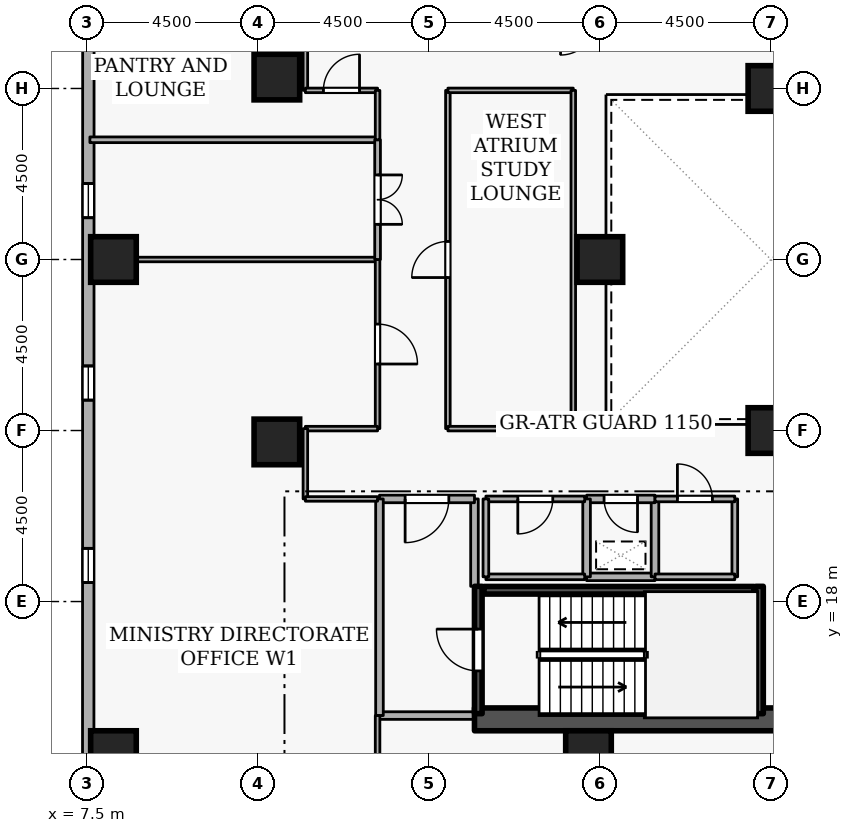
"""IFC4 building model, lengths in metres.
Left out: names, types, materials, properties, quantities, classifications, styles, units other than length and angle.
Written with IfcOpenShell. Run it as: python <this file> out.ifc"""

import sys

from ifc_helpers import new_model, si_unit, direction, frame, frame_2d, origin, origin_2d, place, context, subcontext, project, spatial, rectangle, extrude, element, fill, save


model = new_model("IFC4")
c1 = context("Model", 3, precision=1e-05, world=origin(), true_north=direction((0.0, 1.0)))
c2 = subcontext(c1, "Body", "Model", "MODEL_VIEW")
j1 = project(units=[si_unit("LENGTHUNIT", "METRE"), si_unit("PLANEANGLEUNIT", "RADIAN")], contexts=[c1])
p1 = place(None, origin())
s1 = spatial("IfcSite", under=j1, at=p1, CompositionType="ELEMENT")
p2 = place(p1, origin())
s2 = spatial("IfcBuilding", under=s1, at=p2, CompositionType="ELEMENT")
p3 = place(p2, frame((0.0, 0.0, 90.9)))
s3 = spatial("IfcBuildingStorey", under=s2, at=p3, CompositionType="ELEMENT", Elevation=90.9)
p4 = place(p3, frame((17.7, 14.9, 0.0), z_axis=(0.0, 0.0, 1.0), x_axis=(1.0, 0.0, 0.0)))
e1 = element("IfcWall", 1, at=p4, inside=s3, PredefinedType="SHEAR", context=c2, shape_type="SweptSolid", body=[
    extrude(rectangle(XDim=15.6, YDim=0.6, at=frame_2d((7.8, 0.0))), origin(), (0.0, 0.0, 1.0), 3.6),
])
for number, where, z_axis, x_axis in (
    (2, (8.2, 14.0, 0.0), (0.0, 0.0, 1.0), (1.0, 0.0, 0.0)),
    (3, (8.2, 27.0, 0.0), (0.0, 0.0, 1.0), (1.0, 0.0, 0.0)),
    (4, (12.5, 22.2, 0.0), (0.0, 0.0, 1.0), (1.0, 0.0, 0.0)),
    (5, (12.5, 31.8, 0.0), (0.0, 0.0, 1.0), (1.0, 0.0, 0.0)),
    (6, (20.7, 14.0, 0.0), (0.0, 0.0, 1.0), (1.0, 0.0, 0.0)),
    (7, (25.5, 22.5, 0.0), (0.0, 0.0, 1.0), (1.0, 0.0, 0.0)),
    (8, (25.5, 31.5, 0.0), (0.0, 0.0, 1.0), (1.0, 0.0, 0.0)),
    (9, (21.0, 27.0, 0.0), (0.0, 0.0, 1.0), (1.0, 0.0, 0.0)),
):
    element("IfcColumn", number, at=place(p3, frame(where, z_axis=z_axis, x_axis=x_axis)), inside=s3, PredefinedType="COLUMN", context=c2, shape_type="SweptSolid", body=[
        extrude(rectangle(XDim=1.2, YDim=1.2, at=origin_2d()), origin(), (0.0, 0.0, 1.0), 3.6),
    ])
p5 = place(p3, frame((7.543, 46.099, 0.0), z_axis=(0.0, 0.0, 1.0), x_axis=(-0.000212414941, -0.99999997744, 0.0)))
e10 = element("IfcWall", 10, at=p5, inside=s3, PredefinedType="STANDARD", context=c2, shape_type="SweptSolid", body=[
    extrude(rectangle(XDim=34.481, YDim=0.3, at=frame_2d((17.24, 0.0))), origin(), (0.0, 0.0, 1.0), 2.7),
])
p6 = place(p5, frame((7.5, 0.0, 0.72)))
e11 = element("IfcOpeningElement", 11, at=p6, cuts=e10, PredefinedType="OPENING", context=c2, shape_type="SweptSolid", body=[
    extrude(rectangle(XDim=0.9, YDim=1.75, at=frame_2d((0.45, 0.875))), frame((0.0, 0.16, 0.0), z_axis=(0.0, -1.0, 0.0), x_axis=(1.0, 0.0, 0.0)), (0.0, 0.0, 1.0), 0.32),
])
p7 = place(p5, frame((12.3, 0.0, 0.72)))
e12 = element("IfcOpeningElement", 12, at=p7, cuts=e10, PredefinedType="OPENING", context=c2, shape_type="SweptSolid", body=[
    extrude(rectangle(XDim=0.9, YDim=1.75, at=frame_2d((0.45, 0.875))), frame((0.0, 0.16, 0.0), z_axis=(0.0, -1.0, 0.0), x_axis=(1.0, 0.0, 0.0)), (0.0, 0.0, 1.0), 0.32),
])
p8 = place(p5, frame((17.1, 0.0, 0.72)))
e13 = element("IfcOpeningElement", 13, at=p8, cuts=e10, PredefinedType="OPENING", context=c2, shape_type="SweptSolid", body=[
    extrude(rectangle(XDim=0.9, YDim=1.75, at=frame_2d((0.45, 0.875))), frame((0.0, 0.16, 0.0), z_axis=(0.0, -1.0, 0.0), x_axis=(1.0, 0.0, 0.0)), (0.0, 0.0, 1.0), 0.32),
])
p9 = place(p5, frame((21.9, 0.0, 0.72)))
e14 = element("IfcOpeningElement", 14, at=p9, cuts=e10, PredefinedType="OPENING", context=c2, shape_type="SweptSolid", body=[
    extrude(rectangle(XDim=0.9, YDim=1.75, at=frame_2d((0.45, 0.875))), frame((0.0, 0.16, 0.0), z_axis=(0.0, -1.0, 0.0), x_axis=(1.0, 0.0, 0.0)), (0.0, 0.0, 1.0), 0.32),
])
p10 = place(p5, frame((26.7, 0.0, 0.72)))
e15 = element("IfcOpeningElement", 15, at=p10, cuts=e10, PredefinedType="OPENING", context=c2, shape_type="SweptSolid", body=[
    extrude(rectangle(XDim=0.9, YDim=1.75, at=frame_2d((0.45, 0.875))), frame((0.0, 0.16, 0.0), z_axis=(0.0, -1.0, 0.0), x_axis=(1.0, 0.0, 0.0)), (0.0, 0.0, 1.0), 0.32),
])
p11 = place(p3, frame((17.8, 15.05, 0.0), z_axis=(0.0, 0.0, 1.0), x_axis=(0.0, 1.0, 0.0)))
e16 = element("IfcWall", 16, at=p11, inside=s3, PredefinedType="SHEAR", context=c2, shape_type="SweptSolid", body=[
    extrude(rectangle(XDim=3.35, YDim=0.2, at=frame_2d((1.675, 0.0))), origin(), (0.0, 0.0, 1.0), 3.6),
])
p12 = place(p11, frame((1.125, 0.0, 0.0)))
e17 = element("IfcOpeningElement", 17, at=p12, cuts=e16, PredefinedType="OPENING", context=c2, shape_type="SweptSolid", body=[
    extrude(rectangle(XDim=1.1, YDim=2.1, at=frame_2d((0.55, 1.05))), frame((0.0, 0.11, 0.0), z_axis=(0.0, -1.0, 0.0), x_axis=(1.0, 0.0, 0.0)), (0.0, 0.0, 1.0), 0.22),
])
p13 = place(p3, frame((25.2, 18.4, 0.0), z_axis=(0.0, 0.0, 1.0), x_axis=(0.0, -1.0, 0.0)))
e18 = element("IfcWall", 18, at=p13, inside=s3, PredefinedType="SHEAR", context=c2, shape_type="SweptSolid", body=[
    extrude(rectangle(XDim=3.35, YDim=0.2, at=frame_2d((1.675, 0.0))), origin(), (0.0, 0.0, 1.0), 3.6),
])
p14 = place(p3, frame((25.05, 18.297, 0.0), z_axis=(0.0, 0.0, 1.0), x_axis=(-1.0, 0.0, 0.0)))
e19 = element("IfcWall", 19, at=p14, inside=s3, PredefinedType="SHEAR", context=c2, shape_type="SweptSolid", body=[
    extrude(rectangle(XDim=7.1, YDim=0.2, at=frame_2d((3.55, 0.0))), origin(), (0.0, 0.0, 1.0), 3.6),
])
p15 = place(p3, frame((15.2, 15.0, 0.0), z_axis=(0.0, 0.0, 1.0), x_axis=(1.0, 0.0, 0.0)))
e20 = element("IfcWall", 20, at=p15, inside=s3, PredefinedType="STANDARD", context=c2, shape_type="SweptSolid", body=[
    extrude(rectangle(XDim=2.5, YDim=0.2, at=frame_2d((1.25, 0.0))), origin(), (0.0, 0.0, 1.0), 3.34),
])
p16 = place(p3, frame((17.7, 18.4, 0.0), z_axis=(0.0, 0.0, 1.0), x_axis=(0.0, 1.0, 0.0)))
e21 = element("IfcWall", 21, at=p16, inside=s3, PredefinedType="STANDARD", context=c2, shape_type="SweptSolid", body=[
    extrude(rectangle(XDim=2.3, YDim=0.2, at=frame_2d((1.15, 0.0))), origin(), (0.0, 0.0, 1.0), 2.545),
])
p17 = place(p3, frame((17.7, 20.7, 0.0), z_axis=(0.0, 0.0, 1.0), x_axis=(-1.0, 0.0, 0.0)))
e22 = element("IfcWall", 22, at=p17, inside=s3, PredefinedType="STANDARD", context=c2, shape_type="SweptSolid", body=[
    extrude(rectangle(XDim=2.5, YDim=0.2, at=frame_2d((1.25, 0.0))), origin(), (0.0, 0.0, 1.0), 3.34),
])
p18 = place(p17, frame((0.675, 0.0, 0.0)))
e23 = element("IfcOpeningElement", 23, at=p18, cuts=e22, PredefinedType="OPENING", context=c2, shape_type="SweptSolid", body=[
    extrude(rectangle(XDim=1.15, YDim=2.1, at=frame_2d((0.575, 1.05))), frame((0.0, 0.11, 0.0), z_axis=(0.0, -1.0, 0.0), x_axis=(1.0, 0.0, 0.0)), (0.0, 0.0, 1.0), 0.22),
])
p19 = place(p3, frame((15.2, 20.7, 0.0), z_axis=(0.0, 0.0, 1.0), x_axis=(0.0, -1.0, 0.0)))
e24 = element("IfcWall", 24, at=p19, inside=s3, PredefinedType="STANDARD", context=c2, shape_type="SweptSolid", body=[
    extrude(rectangle(XDim=5.7, YDim=0.2, at=frame_2d((2.85, 0.0))), origin(), (0.0, 0.0, 1.0), 3.34),
])
p20 = place(p3, frame((20.65, 18.65, 0.0), z_axis=(0.0, 0.0, 1.0), x_axis=(1.0, 0.0, 0.0)))
e25 = element("IfcWall", 25, at=p20, inside=s3, PredefinedType="STANDARD", context=c2, shape_type="SweptSolid", body=[
    extrude(rectangle(XDim=1.8, YDim=0.2, at=frame_2d((0.9, 0.0))), origin(), (0.0, 0.0, 1.0), 3.34),
])
p21 = place(p3, frame((22.45, 18.65, 0.0), z_axis=(0.0, 0.0, 1.0), x_axis=(0.0, 1.0, 0.0)))
e26 = element("IfcWall", 26, at=p21, inside=s3, PredefinedType="STANDARD", context=c2, shape_type="SweptSolid", body=[
    extrude(rectangle(XDim=2.05, YDim=0.2, at=frame_2d((1.025, 0.0))), origin(), (0.0, 0.0, 1.0), 3.34),
])
p22 = place(p3, frame((22.45, 20.7, 0.0), z_axis=(0.0, 0.0, 1.0), x_axis=(-1.0, 0.0, 0.0)))
e27 = element("IfcWall", 27, at=p22, inside=s3, PredefinedType="STANDARD", context=c2, shape_type="SweptSolid", body=[
    extrude(rectangle(XDim=1.8, YDim=0.2, at=frame_2d((0.9, 0.0))), origin(), (0.0, 0.0, 1.0), 3.34),
])
p23 = place(p22, frame((0.46, 0.0, 0.0)))
e28 = element("IfcOpeningElement", 28, at=p23, cuts=e27, PredefinedType="OPENING", context=c2, shape_type="SweptSolid", body=[
    extrude(rectangle(XDim=0.88, YDim=2.04, at=frame_2d((0.44, 1.02))), frame((0.0, 0.11, 0.0), z_axis=(0.0, -1.0, 0.0), x_axis=(1.0, 0.0, 0.0)), (0.0, 0.0, 1.0), 0.22),
])
p24 = place(p3, frame((20.65, 20.7, 0.0), z_axis=(0.0, 0.0, 1.0), x_axis=(0.0, -1.0, 0.0)))
e29 = element("IfcWall", 29, at=p24, inside=s3, PredefinedType="STANDARD", context=c2, shape_type="SweptSolid", body=[
    extrude(rectangle(XDim=2.05, YDim=0.2, at=frame_2d((1.025, 0.0))), origin(), (0.0, 0.0, 1.0), 3.34),
])
p25 = place(p3, frame((18.0, 18.65, 0.0), z_axis=(0.0, 0.0, 1.0), x_axis=(1.0, 0.0, 0.0)))
e30 = element("IfcWall", 30, at=p25, inside=s3, PredefinedType="PARTITIONING", context=c2, shape_type="SweptSolid", body=[
    extrude(rectangle(XDim=2.6, YDim=0.15, at=frame_2d((1.3, 0.0))), origin(), (0.0, 0.0, 1.0), 3.34),
])
p26 = place(p3, frame((20.6, 20.7, 0.0), z_axis=(0.0, 0.0, 1.0), x_axis=(-1.0, 0.0, 0.0)))
e31 = element("IfcWall", 31, at=p26, inside=s3, PredefinedType="PARTITIONING", context=c2, shape_type="SweptSolid", body=[
    extrude(rectangle(XDim=2.6, YDim=0.15, at=frame_2d((1.3, 0.0))), origin(), (0.0, 0.0, 1.0), 3.34),
])
p27 = place(p26, frame((0.84, 0.0, 0.0)))
e32 = element("IfcOpeningElement", 32, at=p27, cuts=e31, PredefinedType="OPENING", context=c2, shape_type="SweptSolid", body=[
    extrude(rectangle(XDim=0.92, YDim=2.08, at=frame_2d((0.46, 1.04))), frame((0.0, 0.085, 0.0), z_axis=(0.0, -1.0, 0.0), x_axis=(1.0, 0.0, 0.0)), (0.0, 0.0, 1.0), 0.17),
])
p28 = place(p3, frame((18.0, 20.7, 0.0), z_axis=(0.0, 0.0, 1.0), x_axis=(0.0, -1.0, 0.0)))
e33 = element("IfcWall", 33, at=p28, inside=s3, PredefinedType="PARTITIONING", context=c2, shape_type="SweptSolid", body=[
    extrude(rectangle(XDim=2.05, YDim=0.15, at=frame_2d((1.025, 0.0))), origin(), (0.0, 0.0, 1.0), 2.545),
])
p29 = place(p3, frame((24.55, 20.7, 0.0), z_axis=(0.0, 0.0, 1.0), x_axis=(0.0, -1.0, 0.0)))
e34 = element("IfcWall", 34, at=p29, inside=s3, PredefinedType="PARTITIONING", context=c2, shape_type="SweptSolid", body=[
    extrude(rectangle(XDim=2.05, YDim=0.15, at=frame_2d((1.025, 0.0))), origin(), (0.0, 0.0, 1.0), 3.34),
])
p30 = place(p3, frame((24.55, 18.65, 0.0), z_axis=(0.0, 0.0, 1.0), x_axis=(-1.0, 0.0, 0.0)))
e35 = element("IfcWall", 35, at=p30, inside=s3, PredefinedType="PARTITIONING", context=c2, shape_type="SweptSolid", body=[
    extrude(rectangle(XDim=2.1, YDim=0.15, at=frame_2d((1.05, 0.0))), origin(), (0.0, 0.0, 1.0), 3.34),
])
p31 = place(p3, frame((22.45, 20.7, 0.0), z_axis=(0.0, 0.0, 1.0), x_axis=(1.0, 0.0, 0.0)))
e36 = element("IfcWall", 36, at=p31, inside=s3, PredefinedType="PARTITIONING", context=c2, shape_type="SweptSolid", body=[
    extrude(rectangle(XDim=2.1, YDim=0.15, at=frame_2d((1.05, 0.0))), origin(), (0.0, 0.0, 1.0), 3.34),
])
p32 = place(p31, frame((0.59, 0.0, 0.0)))
e37 = element("IfcOpeningElement", 37, at=p32, cuts=e36, PredefinedType="OPENING", context=c2, shape_type="SweptSolid", body=[
    extrude(rectangle(XDim=0.92, YDim=2.08, at=frame_2d((0.46, 1.04))), frame((0.0, 0.085, 0.0), z_axis=(0.0, -1.0, 0.0), x_axis=(1.0, 0.0, 0.0)), (0.0, 0.0, 1.0), 0.17),
])
p33 = place(p3, frame((8.2, 27.0, 0.0), z_axis=(0.0, 0.0, 1.0), x_axis=(1.0, 0.0, 0.0)))
e38 = element("IfcWall", 38, at=p33, inside=s3, PredefinedType="PARTITIONING", context=c2, shape_type="SweptSolid", body=[
    extrude(rectangle(XDim=6.95, YDim=0.12, at=frame_2d((3.475, 0.0))), origin(), (0.0, 0.0, 1.0), 2.932),
])
p34 = place(p3, frame((15.15, 27.0, 0.0), z_axis=(0.0, 0.0, 1.0), x_axis=(0.0, -1.0, 0.0)))
e39 = element("IfcWall", 39, at=p34, inside=s3, PredefinedType="PARTITIONING", context=c2, shape_type="SweptSolid", body=[
    extrude(rectangle(XDim=4.45, YDim=0.12, at=frame_2d((2.225, 0.0))), origin(), (0.0, 0.0, 1.0), 3.34),
])
p35 = place(p34, frame((1.7, 0.0, 0.0)))
e40 = element("IfcOpeningElement", 40, at=p35, cuts=e39, PredefinedType="OPENING", context=c2, shape_type="SweptSolid", body=[
    extrude(rectangle(XDim=1.05, YDim=2.1, at=frame_2d((0.525, 1.05))), frame((0.0, 0.07, 0.0), z_axis=(0.0, -1.0, 0.0), x_axis=(1.0, 0.0, 0.0)), (0.0, 0.0, 1.0), 0.14),
])
p36 = place(p3, frame((15.15, 22.55, 0.0), z_axis=(0.0, 0.0, 1.0), x_axis=(-1.0, 0.0, 0.0)))
e41 = element("IfcWall", 41, at=p36, inside=s3, PredefinedType="PARTITIONING", context=c2, shape_type="SweptSolid", body=[
    extrude(rectangle(XDim=1.9, YDim=0.12, at=frame_2d((0.95, 0.0))), origin(), (0.0, 0.0, 1.0), 3.34),
])
p37 = place(p3, frame((13.25, 22.55, 0.0), z_axis=(0.0, 0.0, 1.0), x_axis=(0.0, -1.0, 0.0)))
e42 = element("IfcWall", 42, at=p37, inside=s3, PredefinedType="PARTITIONING", context=c2, shape_type="SweptSolid", body=[
    extrude(rectangle(XDim=1.85, YDim=0.12, at=frame_2d((0.925, 0.0))), origin(), (0.0, 0.0, 1.0), 3.34),
])
p38 = place(p3, frame((13.25, 20.7, 0.0), z_axis=(0.0, 0.0, 1.0), x_axis=(1.0, 0.0, 0.0)))
e43 = element("IfcWall", 43, at=p38, inside=s3, PredefinedType="PARTITIONING", context=c2, shape_type="SweptSolid", body=[
    extrude(rectangle(XDim=1.9, YDim=0.12, at=frame_2d((0.95, 0.0))), origin(), (0.0, 0.0, 1.0), 3.34),
])
p39 = place(p3, frame((15.15, 15.0, 0.0), z_axis=(0.0, 0.0, 1.0), x_axis=(0.0, -1.0, 0.0)))
e44 = element("IfcWall", 44, at=p39, inside=s3, PredefinedType="PARTITIONING", context=c2, shape_type="SweptSolid", body=[
    extrude(rectangle(XDim=5.92, YDim=0.12, at=frame_2d((2.96, 0.0))), origin(), (0.0, 0.0, 1.0), 3.34),
])
p40 = place(p3, frame((7.58, 30.15, 0.0), z_axis=(0.0, 0.0, 1.0), x_axis=(1.0, 0.0, 0.0)))
e45 = element("IfcWall", 45, at=p40, inside=s3, PredefinedType="PARTITIONING", context=c2, shape_type="SweptSolid", body=[
    extrude(rectangle(XDim=7.57, YDim=0.15, at=frame_2d((3.785, 0.0))), origin(), (0.0, 0.0, 1.0), 3.34),
])
p41 = place(p3, frame((15.15, 30.15, 0.0), z_axis=(0.0, 0.0, 1.0), x_axis=(0.0, -1.0, 0.0)))
e46 = element("IfcWall", 46, at=p41, inside=s3, PredefinedType="PARTITIONING", context=c2, shape_type="SweptSolid", body=[
    extrude(rectangle(XDim=3.15, YDim=0.15, at=frame_2d((1.575, 0.0))), origin(), (0.0, 0.0, 1.0), 3.34),
])
p42 = place(p41, frame((0.925, 0.0, 0.0)))
e47 = element("IfcOpeningElement", 47, at=p42, cuts=e46, PredefinedType="OPENING", context=c2, shape_type="SweptSolid", body=[
    extrude(rectangle(XDim=1.3, YDim=2.12, at=frame_2d((0.65, 1.06))), frame((0.0, 0.085, 0.0), z_axis=(0.0, -1.0, 0.0), x_axis=(1.0, 0.0, 0.0)), (0.0, 0.0, 1.0), 0.17),
])
p43 = place(p3, frame((13.25, 33.3, 0.0), z_axis=(0.0, 0.0, 1.0), x_axis=(0.0, -1.0, 0.0)))
e48 = element("IfcWall", 48, at=p43, inside=s3, PredefinedType="PARTITIONING", context=c2, shape_type="SweptSolid", body=[
    extrude(rectangle(XDim=1.85, YDim=0.12, at=frame_2d((0.925, 0.0))), origin(), (0.0, 0.0, 1.0), 3.34),
])
p44 = place(p3, frame((13.25, 31.45, 0.0), z_axis=(0.0, 0.0, 1.0), x_axis=(1.0, 0.0, 0.0)))
e49 = element("IfcWall", 49, at=p44, inside=s3, PredefinedType="PARTITIONING", context=c2, shape_type="SweptSolid", body=[
    extrude(rectangle(XDim=1.9, YDim=0.12, at=frame_2d((0.95, 0.0))), origin(), (0.0, 0.0, 1.0), 3.34),
])
p45 = place(p44, frame((0.475, 0.0, 0.0)))
e50 = element("IfcOpeningElement", 50, at=p45, cuts=e49, PredefinedType="OPENING", context=c2, shape_type="SweptSolid", body=[
    extrude(rectangle(XDim=0.95, YDim=2.1, at=frame_2d((0.475, 1.05))), frame((0.0, 0.07, 0.0), z_axis=(0.0, -1.0, 0.0), x_axis=(1.0, 0.0, 0.0)), (0.0, 0.0, 1.0), 0.14),
])
p46 = place(p3, frame((15.15, 31.45, 0.0), z_axis=(0.0, 0.0, 1.0), x_axis=(0.0, -1.0, 0.0)))
e51 = element("IfcWall", 51, at=p46, inside=s3, PredefinedType="PARTITIONING", context=c2, shape_type="SweptSolid", body=[
    extrude(rectangle(XDim=1.3, YDim=0.12, at=frame_2d((0.65, 0.0))), origin(), (0.0, 0.0, 1.0), 3.34),
])
p47 = place(p3, frame((17.0, 22.55, 0.0), z_axis=(0.0, 0.0, 1.0), x_axis=(0.0, 1.0, 0.0)))
e52 = element("IfcWall", 52, at=p47, inside=s3, PredefinedType="PARTITIONING", context=c2, shape_type="SweptSolid", body=[
    extrude(rectangle(XDim=8.9, YDim=0.12, at=frame_2d((4.45, 0.0))), origin(), (0.0, 0.0, 1.0), 3.34),
])
p48 = place(p47, frame((3.975, 0.0, 0.0)))
e53 = element("IfcOpeningElement", 53, at=p48, cuts=e52, PredefinedType="OPENING", context=c2, shape_type="SweptSolid", body=[
    extrude(rectangle(XDim=0.95, YDim=2.1, at=frame_2d((0.475, 1.05))), frame((0.0, 0.07, 0.0), z_axis=(0.0, -1.0, 0.0), x_axis=(1.0, 0.0, 0.0)), (0.0, 0.0, 1.0), 0.14),
])
p49 = place(p3, frame((17.0, 31.45, 0.0), z_axis=(0.0, 0.0, 1.0), x_axis=(1.0, 0.0, 0.0)))
e54 = element("IfcWall", 54, at=p49, inside=s3, PredefinedType="PARTITIONING", context=c2, shape_type="SweptSolid", body=[
    extrude(rectangle(XDim=3.3, YDim=0.12, at=frame_2d((1.65, 0.0))), origin(), (0.0, 0.0, 1.0), 3.34),
])
p50 = place(p3, frame((20.3, 31.45, 0.0), z_axis=(0.0, 0.0, 1.0), x_axis=(0.0, -1.0, 0.0)))
e55 = element("IfcWall", 55, at=p50, inside=s3, PredefinedType="PARTITIONING", context=c2, shape_type="SweptSolid", body=[
    extrude(rectangle(XDim=8.9, YDim=0.12, at=frame_2d((4.45, 0.0))), origin(), (0.0, 0.0, 1.0), 3.34),
])
p51 = place(p3, frame((20.3, 22.55, 0.0), z_axis=(0.0, 0.0, 1.0), x_axis=(-1.0, 0.0, 0.0)))
e56 = element("IfcWall", 56, at=p51, inside=s3, PredefinedType="PARTITIONING", context=c2, shape_type="SweptSolid", body=[
    extrude(rectangle(XDim=3.3, YDim=0.12, at=frame_2d((1.65, 0.0))), origin(), (0.0, 0.0, 1.0), 3.34),
])
p52 = place(p8, origin())
e57 = element("IfcWindow", 57, at=p52, inside=s3, PartitioningType="SINGLE_PANEL", PredefinedType="WINDOW", context=c2, shape_type="SweptSolid", body=[
    extrude(rectangle(XDim=0.9, YDim=1.75, at=frame_2d((0.45, 0.875))), frame((0.0, 0.03, 0.0), z_axis=(0.0, -1.0, 0.0), x_axis=(1.0, 0.0, 0.0)), (0.0, 0.0, 1.0), 0.06),
])
fill(e13, e57)
p53 = place(p9, origin())
e58 = element("IfcWindow", 58, at=p53, inside=s3, PartitioningType="SINGLE_PANEL", PredefinedType="WINDOW", context=c2, shape_type="SweptSolid", body=[
    extrude(rectangle(XDim=0.9, YDim=1.75, at=frame_2d((0.45, 0.875))), frame((0.0, 0.03, 0.0), z_axis=(0.0, -1.0, 0.0), x_axis=(1.0, 0.0, 0.0)), (0.0, 0.0, 1.0), 0.06),
])
fill(e14, e58)
p54 = place(p10, origin())
e59 = element("IfcWindow", 59, at=p54, inside=s3, PartitioningType="SINGLE_PANEL", PredefinedType="WINDOW", context=c2, shape_type="SweptSolid", body=[
    extrude(rectangle(XDim=0.9, YDim=1.75, at=frame_2d((0.45, 0.875))), frame((0.0, 0.03, 0.0), z_axis=(0.0, -1.0, 0.0), x_axis=(1.0, 0.0, 0.0)), (0.0, 0.0, 1.0), 0.06),
])
fill(e15, e59)
p55 = place(p12, origin())
e60 = element("IfcDoor", 60, at=p55, inside=s3, OperationType="SINGLE_SWING_RIGHT", PredefinedType="DOOR", context=c2, shape_type="SweptSolid", body=[
    extrude(rectangle(XDim=1.1, YDim=2.1, at=frame_2d((0.55, 1.05))), frame((0.0, 0.025, 0.0), z_axis=(0.0, -1.0, 0.0), x_axis=(1.0, 0.0, 0.0)), (0.0, 0.0, 1.0), 0.05),
])
fill(e17, e60)
p56 = place(p18, origin())
e61 = element("IfcDoor", 61, at=p56, inside=s3, OperationType="SINGLE_SWING_RIGHT", PredefinedType="DOOR", context=c2, shape_type="SweptSolid", body=[
    extrude(rectangle(XDim=1.15, YDim=2.1, at=frame_2d((0.575, 1.05))), frame((0.0, 0.025, 0.0), z_axis=(0.0, -1.0, 0.0), x_axis=(1.0, 0.0, 0.0)), (0.0, 0.0, 1.0), 0.05),
])
fill(e23, e61)
p57 = place(p23, origin())
e62 = element("IfcDoor", 62, at=p57, inside=s3, OperationType="SINGLE_SWING_LEFT", PredefinedType="DOOR", context=c2, shape_type="SweptSolid", body=[
    extrude(rectangle(XDim=0.88, YDim=2.04, at=frame_2d((0.44, 1.02))), frame((0.0, 0.025, 0.0), z_axis=(0.0, -1.0, 0.0), x_axis=(1.0, 0.0, 0.0)), (0.0, 0.0, 1.0), 0.05),
])
fill(e28, e62)
p58 = place(p27, origin())
e63 = element("IfcDoor", 63, at=p58, inside=s3, OperationType="SINGLE_SWING_RIGHT", PredefinedType="DOOR", context=c2, shape_type="SweptSolid", body=[
    extrude(rectangle(XDim=0.92, YDim=2.08, at=frame_2d((0.46, 1.04))), frame((0.0, 0.025, 0.0), z_axis=(0.0, -1.0, 0.0), x_axis=(1.0, 0.0, 0.0)), (0.0, 0.0, 1.0), 0.05),
])
fill(e32, e63)
p59 = place(p32, origin())
e64 = element("IfcDoor", 64, at=p59, inside=s3, OperationType="SINGLE_SWING_LEFT", PredefinedType="DOOR", context=c2, shape_type="SweptSolid", body=[
    extrude(rectangle(XDim=0.92, YDim=2.08, at=frame_2d((0.46, 1.04))), frame((0.0, 0.025, 0.0), z_axis=(0.0, -1.0, 0.0), x_axis=(1.0, 0.0, 0.0)), (0.0, 0.0, 1.0), 0.05),
])
fill(e37, e64)
p60 = place(p35, origin())
e65 = element("IfcDoor", 65, at=p60, inside=s3, OperationType="SINGLE_SWING_RIGHT", PredefinedType="DOOR", context=c2, shape_type="SweptSolid", body=[
    extrude(rectangle(XDim=1.05, YDim=2.1, at=frame_2d((0.525, 1.05))), frame((0.0, 0.025, 0.0), z_axis=(0.0, -1.0, 0.0), x_axis=(1.0, 0.0, 0.0)), (0.0, 0.0, 1.0), 0.05),
])
fill(e40, e65)
p61 = place(p42, origin())
e66 = element("IfcDoor", 66, at=p61, inside=s3, OperationType="DOUBLE_DOOR_SINGLE_SWING", PredefinedType="DOOR", context=c2, shape_type="SweptSolid", body=[
    extrude(rectangle(XDim=1.3, YDim=2.12, at=frame_2d((0.65, 1.06))), frame((0.0, 0.025, 0.0), z_axis=(0.0, -1.0, 0.0), x_axis=(1.0, 0.0, 0.0)), (0.0, 0.0, 1.0), 0.05),
])
fill(e47, e66)
p62 = place(p45, origin())
e67 = element("IfcDoor", 67, at=p62, inside=s3, OperationType="SINGLE_SWING_RIGHT", PredefinedType="DOOR", context=c2, shape_type="SweptSolid", body=[
    extrude(rectangle(XDim=0.95, YDim=2.1, at=frame_2d((0.475, 1.05))), frame((0.0, 0.025, 0.0), z_axis=(0.0, -1.0, 0.0), x_axis=(1.0, 0.0, 0.0)), (0.0, 0.0, 1.0), 0.05),
])
fill(e50, e67)
p63 = place(p48, origin())
e68 = element("IfcDoor", 68, at=p63, inside=s3, OperationType="SINGLE_SWING_LEFT", PredefinedType="DOOR", context=c2, shape_type="SweptSolid", body=[
    extrude(rectangle(XDim=0.95, YDim=2.1, at=frame_2d((0.475, 1.05))), frame((0.0, 0.025, 0.0), z_axis=(0.0, -1.0, 0.0), x_axis=(1.0, 0.0, 0.0)), (0.0, 0.0, 1.0), 0.05),
])
fill(e53, e68)
save(model, sys.argv[1])
